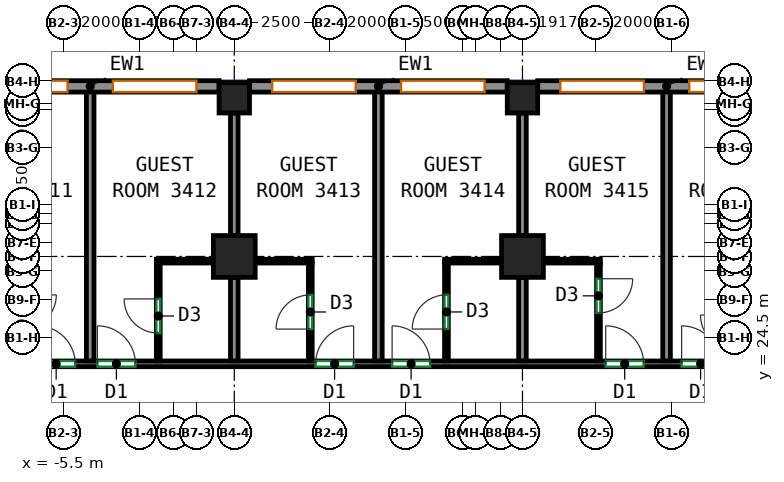
"""IFC4 building model, lengths in metres.
Left out: names, types, materials, properties, quantities, classifications, styles, units other than length and angle.
Written with IfcOpenShell. Run it as: python <this file> out.ifc"""

import sys

from ifc_helpers import new_model, si_unit, direction, frame, frame_2d, origin, origin_2d, place, context, subcontext, project, spatial, rectangle, extrude, source, transform, mapped, element, fill, save


model = new_model("IFC4")
c1 = context("Model", 3, precision=1e-05, world=origin(), true_north=direction((0.0, 1.0)))
c2 = subcontext(c1, "Body", "Model", "MODEL_VIEW")
j1 = project(units=[si_unit("LENGTHUNIT", "METRE"), si_unit("PLANEANGLEUNIT", "RADIAN")], contexts=[c1])
p1 = place(None, origin())
s1 = spatial("IfcSite", under=j1, at=p1, CompositionType="ELEMENT")
p2 = place(p1, origin())
s2 = spatial("IfcBuilding", under=s1, at=p2, CompositionType="ELEMENT")
p3 = place(p2, frame((0.0, 0.0, 150.7)))
s3 = spatial("IfcBuildingStorey", under=s2, at=p3, CompositionType="ELEMENT", Elevation=150.7)
m1 = source(origin(), c2, "Body", "SweptSolid", [
    extrude(rectangle(XDim=1.1, YDim=1.1, at=origin_2d()), origin(), (0.0, 0.0, 1.0), 3.12),
])
p4 = place(p3, frame((-1.0, 26.625, 0.0), z_axis=(0.0, 0.0, 1.0), x_axis=(1.0, 0.0, 0.0)))
e1 = element("IfcColumn", 1, at=p4, inside=s3, PredefinedType="COLUMN", context=c2, shape_type="MappedRepresentation", body=[
    mapped(m1, transform((0.0, 0.0, 0.0))),
])
m2 = source(origin(), c2, "Body", "SweptSolid", [
    extrude(rectangle(XDim=0.8, YDim=0.8, at=origin_2d()), origin(), (0.0, 0.0, 1.0), 3.12),
])
p5 = place(p3, frame((-1.0, 30.8, 0.0), z_axis=(0.0, 0.0, 1.0), x_axis=(1.0, 0.0, 0.0)))
e2 = element("IfcColumn", 2, at=p5, inside=s3, PredefinedType="COLUMN", context=c2, shape_type="MappedRepresentation", body=[
    mapped(m2, transform((0.0, 0.0, 0.0))),
])
p6 = place(p3, frame((6.583, 26.625, 0.0), z_axis=(0.0, 0.0, 1.0), x_axis=(1.0, 0.0, 0.0)))
e3 = element("IfcColumn", 3, at=p6, inside=s3, PredefinedType="COLUMN", context=c2, shape_type="MappedRepresentation", body=[
    mapped(m1, transform((0.0, 0.0, 0.0))),
])
p7 = place(p3, frame((6.583, 30.8, 0.0), z_axis=(0.0, 0.0, 1.0), x_axis=(1.0, 0.0, 0.0)))
e4 = element("IfcColumn", 4, at=p7, inside=s3, PredefinedType="COLUMN", context=c2, shape_type="MappedRepresentation", body=[
    mapped(m2, transform((0.0, 0.0, 0.0))),
])
m3 = source(origin(), c2, "Body", "SweptSolid", [
    extrude(rectangle(XDim=6.783, YDim=0.3, at=frame_2d((3.392, 0.0))), origin(), (0.0, 0.0, 1.0), 3.12),
])
p8 = place(p3, frame((13.767, 31.1, 0.0), z_axis=(0.0, 0.0, 1.0), x_axis=(-1.0, 0.0, 0.0)))
e5 = element("IfcWall", 5, at=p8, inside=s3, PredefinedType="SOLIDWALL", context=c2, shape_type="MappedRepresentation", body=[
    mapped(m3, transform((0.0, 0.0, 0.0))),
])
p9 = place(p8, frame((0.596, 0.0, 0.85)))
e6 = element("IfcOpeningElement", 6, at=p9, cuts=e5, PredefinedType="OPENING", context=c2, shape_type="SweptSolid", body=[
    extrude(rectangle(XDim=2.2, YDim=1.95, at=frame_2d((1.1, 0.975))), frame((0.0, 0.16, 0.0), z_axis=(0.0, -1.0, 0.0), x_axis=(1.0, 0.0, 0.0)), (0.0, 0.0, 1.0), 0.32),
])
p10 = place(p8, frame((3.988, 0.0, 0.85)))
e7 = element("IfcOpeningElement", 7, at=p10, cuts=e5, PredefinedType="OPENING", context=c2, shape_type="SweptSolid", body=[
    extrude(rectangle(XDim=2.2, YDim=1.95, at=frame_2d((1.1, 0.975))), frame((0.0, 0.16, 0.0), z_axis=(0.0, -1.0, 0.0), x_axis=(1.0, 0.0, 0.0)), (0.0, 0.0, 1.0), 0.32),
])
m4 = source(origin(), c2, "Body", "SweptSolid", [
    extrude(rectangle(XDim=6.783, YDim=0.3, at=frame_2d((3.392, 0.0))), origin(), (0.0, 0.0, 1.0), 3.12),
])
p11 = place(p3, frame((6.183, 31.1, 0.0), z_axis=(0.0, 0.0, 1.0), x_axis=(-1.0, 0.0, 0.0)))
e8 = element("IfcWall", 8, at=p11, inside=s3, PredefinedType="SOLIDWALL", context=c2, shape_type="MappedRepresentation", body=[
    mapped(m4, transform((0.0, 0.0, 0.0))),
])
p12 = place(p11, frame((0.596, 0.0, 0.85)))
e9 = element("IfcOpeningElement", 9, at=p12, cuts=e8, PredefinedType="OPENING", context=c2, shape_type="SweptSolid", body=[
    extrude(rectangle(XDim=2.2, YDim=1.95, at=frame_2d((1.1, 0.975))), frame((0.0, 0.16, 0.0), z_axis=(0.0, -1.0, 0.0), x_axis=(1.0, 0.0, 0.0)), (0.0, 0.0, 1.0), 0.32),
])
p13 = place(p11, frame((3.988, 0.0, 0.85)))
e10 = element("IfcOpeningElement", 10, at=p13, cuts=e8, PredefinedType="OPENING", context=c2, shape_type="SweptSolid", body=[
    extrude(rectangle(XDim=2.2, YDim=1.95, at=frame_2d((1.1, 0.975))), frame((0.0, 0.16, 0.0), z_axis=(0.0, -1.0, 0.0), x_axis=(1.0, 0.0, 0.0)), (0.0, 0.0, 1.0), 0.32),
])
p14 = place(p3, frame((-1.4, 31.1, 0.0), z_axis=(0.0, 0.0, 1.0), x_axis=(-1.0, 0.0, 0.0)))
e11 = element("IfcWall", 11, at=p14, inside=s3, PredefinedType="SOLIDWALL", context=c2, shape_type="MappedRepresentation", body=[
    mapped(m4, transform((0.0, 0.0, 0.0))),
])
p15 = place(p14, frame((0.596, 0.0, 0.85)))
e12 = element("IfcOpeningElement", 12, at=p15, cuts=e11, PredefinedType="OPENING", context=c2, shape_type="SweptSolid", body=[
    extrude(rectangle(XDim=2.2, YDim=1.95, at=frame_2d((1.1, 0.975))), frame((0.0, 0.16, 0.0), z_axis=(0.0, -1.0, 0.0), x_axis=(1.0, 0.0, 0.0)), (0.0, 0.0, 1.0), 0.32),
])
p16 = place(p14, frame((3.988, 0.0, 0.85)))
e13 = element("IfcOpeningElement", 13, at=p16, cuts=e11, PredefinedType="OPENING", context=c2, shape_type="SweptSolid", body=[
    extrude(rectangle(XDim=2.2, YDim=1.95, at=frame_2d((1.1, 0.975))), frame((0.0, 0.16, 0.0), z_axis=(0.0, -1.0, 0.0), x_axis=(1.0, 0.0, 0.0)), (0.0, 0.0, 1.0), 0.32),
])
p17 = place(p3, frame((-20.059, 23.8, 0.0), z_axis=(0.0, 0.0, 1.0), x_axis=(1.0, 0.0, 0.0)))
e14 = element("IfcWall", 14, at=p17, inside=s3, PredefinedType="PARTITIONING", context=c2, shape_type="SweptSolid", body=[
    extrude(rectangle(XDim=41.909, YDim=0.15, at=frame_2d((20.955, 0.0))), origin(), (0.0, 0.0, 1.0), 3.12),
])
p18 = place(p17, frame((0.3, 0.0, 0.0)))
e15 = element("IfcOpeningElement", 15, at=p18, cuts=e14, PredefinedType="OPENING", context=c2, shape_type="SweptSolid", body=[
    extrude(rectangle(XDim=1.0, YDim=2.1, at=frame_2d((0.5, 1.05))), frame((0.0, 0.085, 0.0), z_axis=(0.0, -1.0, 0.0), x_axis=(1.0, 0.0, 0.0)), (0.0, 0.0, 1.0), 0.17),
])
p19 = place(p17, frame((6.391, 0.0, 0.0)))
e16 = element("IfcOpeningElement", 16, at=p19, cuts=e14, PredefinedType="OPENING", context=c2, shape_type="SweptSolid", body=[
    extrude(rectangle(XDim=1.0, YDim=2.1, at=frame_2d((0.5, 1.05))), frame((0.0, 0.085, 0.0), z_axis=(0.0, -1.0, 0.0), x_axis=(1.0, 0.0, 0.0)), (0.0, 0.0, 1.0), 0.17),
])
p20 = place(p17, frame((8.183, 0.0, 0.0)))
e17 = element("IfcOpeningElement", 17, at=p20, cuts=e14, PredefinedType="OPENING", context=c2, shape_type="SweptSolid", body=[
    extrude(rectangle(XDim=1.0, YDim=2.1, at=frame_2d((0.5, 1.05))), frame((0.0, 0.085, 0.0), z_axis=(0.0, -1.0, 0.0), x_axis=(1.0, 0.0, 0.0)), (0.0, 0.0, 1.0), 0.17),
])
p21 = place(p17, frame((13.872, 0.0, 0.0)))
e18 = element("IfcOpeningElement", 18, at=p21, cuts=e14, PredefinedType="OPENING", context=c2, shape_type="SweptSolid", body=[
    extrude(rectangle(XDim=1.0, YDim=2.1, at=frame_2d((0.5, 1.05))), frame((0.0, 0.085, 0.0), z_axis=(0.0, -1.0, 0.0), x_axis=(1.0, 0.0, 0.0)), (0.0, 0.0, 1.0), 0.17),
])
p22 = place(p17, frame((15.457, 0.0, 0.0)))
e19 = element("IfcOpeningElement", 19, at=p22, cuts=e14, PredefinedType="OPENING", context=c2, shape_type="SweptSolid", body=[
    extrude(rectangle(XDim=1.0, YDim=2.1, at=frame_2d((0.5, 1.05))), frame((0.0, 0.085, 0.0), z_axis=(0.0, -1.0, 0.0), x_axis=(1.0, 0.0, 0.0)), (0.0, 0.0, 1.0), 0.17),
])
p23 = place(p17, frame((21.199, 0.0, 0.0)))
e20 = element("IfcOpeningElement", 20, at=p23, cuts=e14, PredefinedType="OPENING", context=c2, shape_type="SweptSolid", body=[
    extrude(rectangle(XDim=1.0, YDim=2.1, at=frame_2d((0.5, 1.05))), frame((0.0, 0.085, 0.0), z_axis=(0.0, -1.0, 0.0), x_axis=(1.0, 0.0, 0.0)), (0.0, 0.0, 1.0), 0.17),
])
p24 = place(p17, frame((23.212, 0.0, 0.0)))
e21 = element("IfcOpeningElement", 21, at=p24, cuts=e14, PredefinedType="OPENING", context=c2, shape_type="SweptSolid", body=[
    extrude(rectangle(XDim=1.0, YDim=2.1, at=frame_2d((0.5, 1.05))), frame((0.0, 0.085, 0.0), z_axis=(0.0, -1.0, 0.0), x_axis=(1.0, 0.0, 0.0)), (0.0, 0.0, 1.0), 0.17),
])
p25 = place(p17, frame((28.832, 0.0, 0.0)))
e22 = element("IfcOpeningElement", 22, at=p25, cuts=e14, PredefinedType="OPENING", context=c2, shape_type="SweptSolid", body=[
    extrude(rectangle(XDim=1.0, YDim=2.1, at=frame_2d((0.5, 1.05))), frame((0.0, 0.085, 0.0), z_axis=(0.0, -1.0, 0.0), x_axis=(1.0, 0.0, 0.0)), (0.0, 0.0, 1.0), 0.17),
])
p26 = place(p17, frame((30.83, 0.0, 0.0)))
e23 = element("IfcOpeningElement", 23, at=p26, cuts=e14, PredefinedType="OPENING", context=c2, shape_type="SweptSolid", body=[
    extrude(rectangle(XDim=1.0, YDim=2.1, at=frame_2d((0.5, 1.05))), frame((0.0, 0.085, 0.0), z_axis=(0.0, -1.0, 0.0), x_axis=(1.0, 0.0, 0.0)), (0.0, 0.0, 1.0), 0.17),
])
p27 = place(p17, frame((36.519, 0.0, 0.0)))
e24 = element("IfcOpeningElement", 24, at=p27, cuts=e14, PredefinedType="OPENING", context=c2, shape_type="SweptSolid", body=[
    extrude(rectangle(XDim=1.0, YDim=2.1, at=frame_2d((0.5, 1.05))), frame((0.0, 0.085, 0.0), z_axis=(0.0, -1.0, 0.0), x_axis=(1.0, 0.0, 0.0)), (0.0, 0.0, 1.0), 0.17),
])
p28 = place(p17, frame((38.311, 0.0, 0.0)))
e25 = element("IfcOpeningElement", 25, at=p28, cuts=e14, PredefinedType="OPENING", context=c2, shape_type="SweptSolid", body=[
    extrude(rectangle(XDim=1.0, YDim=2.1, at=frame_2d((0.5, 1.05))), frame((0.0, 0.085, 0.0), z_axis=(0.0, -1.0, 0.0), x_axis=(1.0, 0.0, 0.0)), (0.0, 0.0, 1.0), 0.17),
])
p29 = place(p3, frame((-4.792, 23.877, 0.0), z_axis=(0.0, 0.0, 1.0), x_axis=(0.0, 1.0, 0.0)))
e26 = element("IfcWall", 26, at=p29, inside=s3, PredefinedType="PARTITIONING", context=c2, shape_type="SweptSolid", body=[
    extrude(rectangle(XDim=7.123, YDim=0.2, at=frame_2d((3.562, 0.0))), origin(), (0.0, 0.0, 1.0), 3.12),
])
p30 = place(p3, frame((-3.05, 26.502, 0.0), z_axis=(0.0, 0.0, 1.0), x_axis=(1.0, 0.0, 0.0)))
e27 = element("IfcWall", 27, at=p30, inside=s3, PredefinedType="PARTITIONING", context=c2, shape_type="SweptSolid", body=[
    extrude(rectangle(XDim=1.5, YDim=0.1, at=frame_2d((0.75, 0.0))), origin(), (0.0, 0.0, 1.0), 3.12),
])
p31 = place(p3, frame((-3.0, 23.877, 0.0), z_axis=(0.0, 0.0, 1.0), x_axis=(0.0, 1.0, 0.0)))
e28 = element("IfcWall", 28, at=p31, inside=s3, PredefinedType="PARTITIONING", context=c2, shape_type="SweptSolid", body=[
    extrude(rectangle(XDim=2.575, YDim=0.1, at=frame_2d((1.288, 0.0))), origin(), (0.0, 0.0, 1.0), 3.12),
])
p32 = place(p31, frame((0.731, 0.0, 0.0)))
e29 = element("IfcOpeningElement", 29, at=p32, cuts=e28, PredefinedType="OPENING", context=c2, shape_type="SweptSolid", body=[
    extrude(rectangle(XDim=0.9, YDim=2.1, at=frame_2d((0.45, 1.05))), frame((0.0, 0.06, 0.0), z_axis=(0.0, -1.0, 0.0), x_axis=(1.0, 0.0, 0.0)), (0.0, 0.0, 1.0), 0.12),
])
p33 = place(p3, frame((-1.0, 27.175, 0.0), z_axis=(0.0, 0.0, 1.0), x_axis=(0.0, 1.0, 0.0)))
e30 = element("IfcWall", 30, at=p33, inside=s3, PredefinedType="PARTITIONING", context=c2, shape_type="SweptSolid", body=[
    extrude(rectangle(XDim=3.225, YDim=0.2, at=frame_2d((1.612, 0.0))), origin(), (0.0, 0.0, 1.0), 3.12),
])
p34 = place(p3, frame((-1.0, 23.877, 0.0), z_axis=(0.0, 0.0, 1.0), x_axis=(0.0, 1.0, 0.0)))
e31 = element("IfcWall", 31, at=p34, inside=s3, PredefinedType="PARTITIONING", context=c2, shape_type="SweptSolid", body=[
    extrude(rectangle(XDim=2.198, YDim=0.2, at=frame_2d((1.099, 0.0))), origin(), (0.0, 0.0, 1.0), 3.12),
])
p35 = place(p3, frame((-0.45, 26.502, 0.0), z_axis=(0.0, 0.0, 1.0), x_axis=(1.0, 0.0, 0.0)))
e32 = element("IfcWall", 32, at=p35, inside=s3, PredefinedType="PARTITIONING", context=c2, shape_type="SweptSolid", body=[
    extrude(rectangle(XDim=1.5, YDim=0.1, at=frame_2d((0.75, 0.0))), origin(), (0.0, 0.0, 1.0), 3.12),
])
p36 = place(p3, frame((1.0, 23.877, 0.0), z_axis=(0.0, 0.0, 1.0), x_axis=(0.0, 1.0, 0.0)))
e33 = element("IfcWall", 33, at=p36, inside=s3, PredefinedType="PARTITIONING", context=c2, shape_type="SweptSolid", body=[
    extrude(rectangle(XDim=2.575, YDim=0.1, at=frame_2d((1.288, 0.0))), origin(), (0.0, 0.0, 1.0), 3.12),
])
p37 = place(p36, frame((0.837, 0.0, 0.0)))
e34 = element("IfcOpeningElement", 34, at=p37, cuts=e33, PredefinedType="OPENING", context=c2, shape_type="SweptSolid", body=[
    extrude(rectangle(XDim=0.9, YDim=2.1, at=frame_2d((0.45, 1.05))), frame((0.0, 0.06, 0.0), z_axis=(0.0, -1.0, 0.0), x_axis=(1.0, 0.0, 0.0)), (0.0, 0.0, 1.0), 0.12),
])
p38 = place(p3, frame((2.792, 23.877, 0.0), z_axis=(0.0, 0.0, 1.0), x_axis=(0.0, 1.0, 0.0)))
e35 = element("IfcWall", 35, at=p38, inside=s3, PredefinedType="PARTITIONING", context=c2, shape_type="SweptSolid", body=[
    extrude(rectangle(XDim=7.123, YDim=0.2, at=frame_2d((3.562, 0.0))), origin(), (0.0, 0.0, 1.0), 3.12),
])
p39 = place(p3, frame((4.533, 26.502, 0.0), z_axis=(0.0, 0.0, 1.0), x_axis=(1.0, 0.0, 0.0)))
e36 = element("IfcWall", 36, at=p39, inside=s3, PredefinedType="PARTITIONING", context=c2, shape_type="SweptSolid", body=[
    extrude(rectangle(XDim=1.5, YDim=0.1, at=frame_2d((0.75, 0.0))), origin(), (0.0, 0.0, 1.0), 3.12),
])
p40 = place(p3, frame((4.583, 23.877, 0.0), z_axis=(0.0, 0.0, 1.0), x_axis=(0.0, 1.0, 0.0)))
e37 = element("IfcWall", 37, at=p40, inside=s3, PredefinedType="PARTITIONING", context=c2, shape_type="SweptSolid", body=[
    extrude(rectangle(XDim=2.575, YDim=0.1, at=frame_2d((1.288, 0.0))), origin(), (0.0, 0.0, 1.0), 3.12),
])
p41 = place(p40, frame((0.838, 0.0, 0.0)))
e38 = element("IfcOpeningElement", 38, at=p41, cuts=e37, PredefinedType="OPENING", context=c2, shape_type="SweptSolid", body=[
    extrude(rectangle(XDim=0.9, YDim=2.1, at=frame_2d((0.45, 1.05))), frame((0.0, 0.06, 0.0), z_axis=(0.0, -1.0, 0.0), x_axis=(1.0, 0.0, 0.0)), (0.0, 0.0, 1.0), 0.12),
])
p42 = place(p3, frame((6.583, 27.175, 0.0), z_axis=(0.0, 0.0, 1.0), x_axis=(0.0, 1.0, 0.0)))
e39 = element("IfcWall", 39, at=p42, inside=s3, PredefinedType="PARTITIONING", context=c2, shape_type="SweptSolid", body=[
    extrude(rectangle(XDim=3.225, YDim=0.2, at=frame_2d((1.612, 0.0))), origin(), (0.0, 0.0, 1.0), 3.12),
])
p43 = place(p3, frame((6.583, 23.877, 0.0), z_axis=(0.0, 0.0, 1.0), x_axis=(0.0, 1.0, 0.0)))
e40 = element("IfcWall", 40, at=p43, inside=s3, PredefinedType="PARTITIONING", context=c2, shape_type="SweptSolid", body=[
    extrude(rectangle(XDim=2.198, YDim=0.2, at=frame_2d((1.099, 0.0))), origin(), (0.0, 0.0, 1.0), 3.12),
])
p44 = place(p3, frame((7.133, 26.502, 0.0), z_axis=(0.0, 0.0, 1.0), x_axis=(1.0, 0.0, 0.0)))
e41 = element("IfcWall", 41, at=p44, inside=s3, PredefinedType="PARTITIONING", context=c2, shape_type="SweptSolid", body=[
    extrude(rectangle(XDim=1.5, YDim=0.1, at=frame_2d((0.75, 0.0))), origin(), (0.0, 0.0, 1.0), 3.12),
])
p45 = place(p3, frame((8.583, 26.452, 0.0), z_axis=(0.0, 0.0, 1.0), x_axis=(0.0, -1.0, 0.0)))
e42 = element("IfcWall", 42, at=p45, inside=s3, PredefinedType="PARTITIONING", context=c2, shape_type="SweptSolid", body=[
    extrude(rectangle(XDim=2.575, YDim=0.1, at=frame_2d((1.288, 0.0))), origin(), (0.0, 0.0, 1.0), 3.12),
])
p46 = place(p45, frame((0.413, 0.0, 0.0)))
e43 = element("IfcOpeningElement", 43, at=p46, cuts=e42, PredefinedType="OPENING", context=c2, shape_type="SweptSolid", body=[
    extrude(rectangle(XDim=0.9, YDim=2.1, at=frame_2d((0.45, 1.05))), frame((0.0, 0.06, 0.0), z_axis=(0.0, -1.0, 0.0), x_axis=(1.0, 0.0, 0.0)), (0.0, 0.0, 1.0), 0.12),
])
p47 = place(p3, frame((10.375, 23.877, 0.0), z_axis=(0.0, 0.0, 1.0), x_axis=(0.0, 1.0, 0.0)))
e44 = element("IfcWall", 44, at=p47, inside=s3, PredefinedType="PARTITIONING", context=c2, shape_type="SweptSolid", body=[
    extrude(rectangle(XDim=7.123, YDim=0.2, at=frame_2d((3.562, 0.0))), origin(), (0.0, 0.0, 1.0), 3.12),
])
p48 = place(p9, origin())
e45 = element("IfcWindow", 45, at=p48, inside=s3, PartitioningType="SINGLE_PANEL", PredefinedType="WINDOW", context=c2, shape_type="SweptSolid", body=[
    extrude(rectangle(XDim=2.2, YDim=1.95, at=frame_2d((1.1, 0.975))), frame((0.0, 0.03, 0.0), z_axis=(0.0, -1.0, 0.0), x_axis=(1.0, 0.0, 0.0)), (0.0, 0.0, 1.0), 0.06),
])
fill(e6, e45)
p49 = place(p10, origin())
e46 = element("IfcWindow", 46, at=p49, inside=s3, PartitioningType="SINGLE_PANEL", PredefinedType="WINDOW", context=c2, shape_type="SweptSolid", body=[
    extrude(rectangle(XDim=2.2, YDim=1.95, at=frame_2d((1.1, 0.975))), frame((0.0, 0.03, 0.0), z_axis=(0.0, -1.0, 0.0), x_axis=(1.0, 0.0, 0.0)), (0.0, 0.0, 1.0), 0.06),
])
fill(e7, e46)
p50 = place(p12, origin())
e47 = element("IfcWindow", 47, at=p50, inside=s3, PartitioningType="SINGLE_PANEL", PredefinedType="WINDOW", context=c2, shape_type="SweptSolid", body=[
    extrude(rectangle(XDim=2.2, YDim=1.95, at=frame_2d((1.1, 0.975))), frame((0.0, 0.03, 0.0), z_axis=(0.0, -1.0, 0.0), x_axis=(1.0, 0.0, 0.0)), (0.0, 0.0, 1.0), 0.06),
])
fill(e9, e47)
p51 = place(p13, origin())
e48 = element("IfcWindow", 48, at=p51, inside=s3, PartitioningType="SINGLE_PANEL", PredefinedType="WINDOW", context=c2, shape_type="SweptSolid", body=[
    extrude(rectangle(XDim=2.2, YDim=1.95, at=frame_2d((1.1, 0.975))), frame((0.0, 0.03, 0.0), z_axis=(0.0, -1.0, 0.0), x_axis=(1.0, 0.0, 0.0)), (0.0, 0.0, 1.0), 0.06),
])
fill(e10, e48)
p52 = place(p15, origin())
e49 = element("IfcWindow", 49, at=p52, inside=s3, PartitioningType="SINGLE_PANEL", PredefinedType="WINDOW", context=c2, shape_type="SweptSolid", body=[
    extrude(rectangle(XDim=2.2, YDim=1.95, at=frame_2d((1.1, 0.975))), frame((0.0, 0.03, 0.0), z_axis=(0.0, -1.0, 0.0), x_axis=(1.0, 0.0, 0.0)), (0.0, 0.0, 1.0), 0.06),
])
fill(e12, e49)
p53 = place(p16, origin())
e50 = element("IfcWindow", 50, at=p53, inside=s3, PartitioningType="SINGLE_PANEL", PredefinedType="WINDOW", context=c2, shape_type="SweptSolid", body=[
    extrude(rectangle(XDim=2.2, YDim=1.95, at=frame_2d((1.1, 0.975))), frame((0.0, 0.03, 0.0), z_axis=(0.0, -1.0, 0.0), x_axis=(1.0, 0.0, 0.0)), (0.0, 0.0, 1.0), 0.06),
])
fill(e13, e50)
p54 = place(p21, origin())
e51 = element("IfcDoor", 51, at=p54, inside=s3, OperationType="SINGLE_SWING_LEFT", PredefinedType="DOOR", context=c2, shape_type="SweptSolid", body=[
    extrude(rectangle(XDim=1.0, YDim=2.1, at=frame_2d((0.5, 1.05))), frame((0.0, 0.025, 0.0), z_axis=(0.0, -1.0, 0.0), x_axis=(1.0, 0.0, 0.0)), (0.0, 0.0, 1.0), 0.05),
])
fill(e18, e51)
p55 = place(p22, origin())
e52 = element("IfcDoor", 52, at=p55, inside=s3, OperationType="SINGLE_SWING_LEFT", PredefinedType="DOOR", context=c2, shape_type="SweptSolid", body=[
    extrude(rectangle(XDim=1.0, YDim=2.1, at=frame_2d((0.5, 1.05))), frame((0.0, 0.025, 0.0), z_axis=(0.0, -1.0, 0.0), x_axis=(1.0, 0.0, 0.0)), (0.0, 0.0, 1.0), 0.05),
])
fill(e19, e52)
p56 = place(p23, origin())
e53 = element("IfcDoor", 53, at=p56, inside=s3, OperationType="SINGLE_SWING_RIGHT", PredefinedType="DOOR", context=c2, shape_type="SweptSolid", body=[
    extrude(rectangle(XDim=1.0, YDim=2.1, at=frame_2d((0.5, 1.05))), frame((0.0, 0.025, 0.0), z_axis=(0.0, -1.0, 0.0), x_axis=(1.0, 0.0, 0.0)), (0.0, 0.0, 1.0), 0.05),
])
fill(e20, e53)
p57 = place(p24, origin())
e54 = element("IfcDoor", 54, at=p57, inside=s3, OperationType="SINGLE_SWING_LEFT", PredefinedType="DOOR", context=c2, shape_type="SweptSolid", body=[
    extrude(rectangle(XDim=1.0, YDim=2.1, at=frame_2d((0.5, 1.05))), frame((0.0, 0.025, 0.0), z_axis=(0.0, -1.0, 0.0), x_axis=(1.0, 0.0, 0.0)), (0.0, 0.0, 1.0), 0.05),
])
fill(e21, e54)
p58 = place(p25, origin())
e55 = element("IfcDoor", 55, at=p58, inside=s3, OperationType="SINGLE_SWING_LEFT", PredefinedType="DOOR", context=c2, shape_type="SweptSolid", body=[
    extrude(rectangle(XDim=1.0, YDim=2.1, at=frame_2d((0.5, 1.05))), frame((0.0, 0.025, 0.0), z_axis=(0.0, -1.0, 0.0), x_axis=(1.0, 0.0, 0.0)), (0.0, 0.0, 1.0), 0.05),
])
fill(e22, e55)
p59 = place(p26, origin())
e56 = element("IfcDoor", 56, at=p59, inside=s3, OperationType="SINGLE_SWING_LEFT", PredefinedType="DOOR", context=c2, shape_type="SweptSolid", body=[
    extrude(rectangle(XDim=1.0, YDim=2.1, at=frame_2d((0.5, 1.05))), frame((0.0, 0.025, 0.0), z_axis=(0.0, -1.0, 0.0), x_axis=(1.0, 0.0, 0.0)), (0.0, 0.0, 1.0), 0.05),
])
fill(e23, e56)
p60 = place(p32, origin())
e57 = element("IfcDoor", 57, at=p60, inside=s3, OperationType="SINGLE_SWING_RIGHT", PredefinedType="DOOR", context=c2, shape_type="SweptSolid", body=[
    extrude(rectangle(XDim=0.9, YDim=2.1, at=frame_2d((0.45, 1.05))), frame((0.0, 0.025, 0.0), z_axis=(0.0, -1.0, 0.0), x_axis=(1.0, 0.0, 0.0)), (0.0, 0.0, 1.0), 0.05),
])
fill(e29, e57)
p61 = place(p37, origin())
e58 = element("IfcDoor", 58, at=p61, inside=s3, OperationType="SINGLE_SWING_LEFT", PredefinedType="DOOR", context=c2, shape_type="SweptSolid", body=[
    extrude(rectangle(XDim=0.9, YDim=2.1, at=frame_2d((0.45, 1.05))), frame((0.0, 0.025, 0.0), z_axis=(0.0, -1.0, 0.0), x_axis=(1.0, 0.0, 0.0)), (0.0, 0.0, 1.0), 0.05),
])
fill(e34, e58)
p62 = place(p41, origin())
e59 = element("IfcDoor", 59, at=p62, inside=s3, OperationType="SINGLE_SWING_LEFT", PredefinedType="DOOR", context=c2, shape_type="SweptSolid", body=[
    extrude(rectangle(XDim=0.9, YDim=2.1, at=frame_2d((0.45, 1.05))), frame((0.0, 0.025, 0.0), z_axis=(0.0, -1.0, 0.0), x_axis=(1.0, 0.0, 0.0)), (0.0, 0.0, 1.0), 0.05),
])
fill(e38, e59)
p63 = place(p46, origin())
e60 = element("IfcDoor", 60, at=p63, inside=s3, OperationType="SINGLE_SWING_LEFT", PredefinedType="DOOR", context=c2, shape_type="SweptSolid", body=[
    extrude(rectangle(XDim=0.9, YDim=2.1, at=frame_2d((0.45, 1.05))), frame((0.0, 0.025, 0.0), z_axis=(0.0, -1.0, 0.0), x_axis=(1.0, 0.0, 0.0)), (0.0, 0.0, 1.0), 0.05),
])
fill(e43, e60)
save(model, sys.argv[1])
